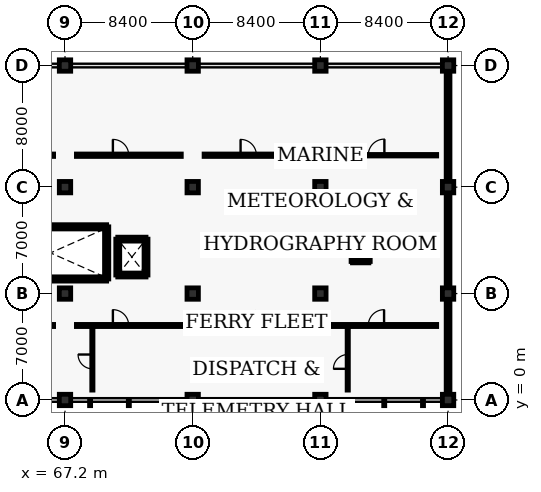
"""IFC4 building model, lengths in metres.
Left out: names, types, materials, properties, quantities, classifications, styles, units other than length and angle.
Written with IfcOpenShell. Run it as: python <this file> out.ifc"""

import sys

from ifc_helpers import new_model, si_unit, direction, frame, frame_2d, origin, origin_2d, place, context, subcontext, project, spatial, rectangle, extrude, element, fill, save


model = new_model("IFC4")
c1 = context("Model", 3, precision=1e-05, world=origin(), true_north=direction((0.0, 1.0)))
c2 = subcontext(c1, "Body", "Model", "MODEL_VIEW")
j1 = project(units=[si_unit("LENGTHUNIT", "METRE"), si_unit("PLANEANGLEUNIT", "RADIAN")], contexts=[c1])
p1 = place(None, origin())
s1 = spatial("IfcSite", under=j1, at=p1, CompositionType="ELEMENT")
p2 = place(p1, origin())
s2 = spatial("IfcBuilding", under=s1, at=p2, CompositionType="ELEMENT")
p3 = place(p2, frame((0.0, 0.0, 9.6)))
s3 = spatial("IfcBuildingStorey", under=s2, at=p3, CompositionType="ELEMENT", Elevation=9.6)
for number, where, z_axis, x_axis in (
    (1, (67.2, 0.0, 0.0), (0.0, 0.0, 1.0), (1.0, 0.0, 0.0)),
    (2, (67.2, 7.0, 0.0), (0.0, 0.0, 1.0), (1.0, 0.0, 0.0)),
    (3, (67.2, 14.0, 0.0), (0.0, 0.0, 1.0), (1.0, 0.0, 0.0)),
    (4, (67.2, 22.0, 0.0), (0.0, 0.0, 1.0), (1.0, 0.0, 0.0)),
    (5, (75.6, 0.0, 0.0), (0.0, 0.0, 1.0), (1.0, 0.0, 0.0)),
    (6, (75.6, 7.0, 0.0), (0.0, 0.0, 1.0), (1.0, 0.0, 0.0)),
    (7, (75.6, 14.0, 0.0), (0.0, 0.0, 1.0), (1.0, 0.0, 0.0)),
    (8, (75.6, 22.0, 0.0), (0.0, 0.0, 1.0), (1.0, 0.0, 0.0)),
    (9, (84.0, 0.0, 0.0), (0.0, 0.0, 1.0), (1.0, 0.0, 0.0)),
    (10, (84.0, 7.0, 0.0), (0.0, 0.0, 1.0), (1.0, 0.0, 0.0)),
    (11, (84.0, 14.0, 0.0), (0.0, 0.0, 1.0), (1.0, 0.0, 0.0)),
    (12, (84.0, 22.0, 0.0), (0.0, 0.0, 1.0), (1.0, 0.0, 0.0)),
    (13, (92.4, 0.0, 0.0), (0.0, 0.0, 1.0), (1.0, 0.0, 0.0)),
    (14, (92.4, 7.0, 0.0), (0.0, 0.0, 1.0), (1.0, 0.0, 0.0)),
    (15, (92.4, 14.0, 0.0), (0.0, 0.0, 1.0), (1.0, 0.0, 0.0)),
    (16, (92.4, 22.0, 0.0), (0.0, 0.0, 1.0), (1.0, 0.0, 0.0)),
):
    element("IfcColumn", number, at=place(p3, frame(where, z_axis=z_axis, x_axis=x_axis)), inside=s3, PredefinedType="COLUMN", context=c2, shape_type="SweptSolid", body=[
        extrude(rectangle(XDim=0.75, YDim=0.75, at=origin_2d()), origin(), (0.0, 0.0, 1.0), 3.52),
    ])
p4 = place(p3, frame((92.4, 0.375, 0.0), z_axis=(0.0, 0.0, 1.0), x_axis=(0.0, 1.0, 0.0)))
e17 = element("IfcWall", 17, at=p4, inside=s3, PredefinedType="SOLIDWALL", context=c2, shape_type="SweptSolid", body=[
    extrude(rectangle(XDim=6.25, YDim=0.25, at=frame_2d((3.125, 0.0))), origin(), (0.0, 0.0, 1.0), 2.605),
])
p5 = place(p4, frame((1.415, 0.0, 0.95)))
e18 = element("IfcOpeningElement", 18, at=p5, cuts=e17, PredefinedType="OPENING", context=c2, shape_type="SweptSolid", body=[
    extrude(rectangle(XDim=1.8, YDim=1.5, at=frame_2d((0.9, 0.75))), frame((0.0, 0.135, 0.0), z_axis=(0.0, -1.0, 0.0), x_axis=(1.0, 0.0, 0.0)), (0.0, 0.0, 1.0), 0.27),
])
p6 = place(p4, frame((4.015, 0.0, 0.95)))
e19 = element("IfcOpeningElement", 19, at=p6, cuts=e17, PredefinedType="OPENING", context=c2, shape_type="SweptSolid", body=[
    extrude(rectangle(XDim=1.5, YDim=1.5, at=frame_2d((0.75, 0.75))), frame((0.0, 0.135, 0.0), z_axis=(0.0, -1.0, 0.0), x_axis=(1.0, 0.0, 0.0)), (0.0, 0.0, 1.0), 0.27),
])
p7 = place(p3, frame((92.4, 7.375, 0.0), z_axis=(0.0, 0.0, 1.0), x_axis=(0.0, 1.0, 0.0)))
e20 = element("IfcWall", 20, at=p7, inside=s3, PredefinedType="SOLIDWALL", context=c2, shape_type="SweptSolid", body=[
    extrude(rectangle(XDim=6.25, YDim=0.25, at=frame_2d((3.125, 0.0))), origin(), (0.0, 0.0, 1.0), 2.605),
])
p8 = place(p7, frame((1.415, 0.0, 0.95)))
e21 = element("IfcOpeningElement", 21, at=p8, cuts=e20, PredefinedType="OPENING", context=c2, shape_type="SweptSolid", body=[
    extrude(rectangle(XDim=1.8, YDim=1.5, at=frame_2d((0.9, 0.75))), frame((0.0, 0.135, 0.0), z_axis=(0.0, -1.0, 0.0), x_axis=(1.0, 0.0, 0.0)), (0.0, 0.0, 1.0), 0.27),
])
p9 = place(p7, frame((4.015, 0.0, 0.95)))
e22 = element("IfcOpeningElement", 22, at=p9, cuts=e20, PredefinedType="OPENING", context=c2, shape_type="SweptSolid", body=[
    extrude(rectangle(XDim=1.5, YDim=1.5, at=frame_2d((0.75, 0.75))), frame((0.0, 0.135, 0.0), z_axis=(0.0, -1.0, 0.0), x_axis=(1.0, 0.0, 0.0)), (0.0, 0.0, 1.0), 0.27),
])
p10 = place(p3, frame((92.4, 14.375, 0.0), z_axis=(0.0, 0.0, 1.0), x_axis=(0.0, 1.0, 0.0)))
e23 = element("IfcWall", 23, at=p10, inside=s3, PredefinedType="SOLIDWALL", context=c2, shape_type="SweptSolid", body=[
    extrude(rectangle(XDim=7.25, YDim=0.25, at=frame_2d((3.625, 0.0))), origin(), (0.0, 0.0, 1.0), 2.605),
])
p11 = place(p10, frame((1.415, 0.0, 0.95)))
e24 = element("IfcOpeningElement", 24, at=p11, cuts=e23, PredefinedType="OPENING", context=c2, shape_type="SweptSolid", body=[
    extrude(rectangle(XDim=1.8, YDim=1.5, at=frame_2d((0.9, 0.75))), frame((0.0, 0.135, 0.0), z_axis=(0.0, -1.0, 0.0), x_axis=(1.0, 0.0, 0.0)), (0.0, 0.0, 1.0), 0.27),
])
p12 = place(p10, frame((4.015, 0.0, 0.95)))
e25 = element("IfcOpeningElement", 25, at=p12, cuts=e23, PredefinedType="OPENING", context=c2, shape_type="SweptSolid", body=[
    extrude(rectangle(XDim=1.5, YDim=1.5, at=frame_2d((0.75, 0.75))), frame((0.0, 0.135, 0.0), z_axis=(0.0, -1.0, 0.0), x_axis=(1.0, 0.0, 0.0)), (0.0, 0.0, 1.0), 0.27),
])
for number, where, z_axis, x_axis in (
    (26, (61.06, 7.96, 0.0), (0.0, 0.0, 1.0), (1.0, 0.0, 0.0)),
    (27, (61.06, 11.39, 0.0), (0.0, 0.0, 1.0), (1.0, 0.0, 0.0)),
):
    element("IfcWall", number, at=place(p3, frame(where, z_axis=z_axis, x_axis=x_axis)), inside=s3, PredefinedType="SHEAR", context=c2, shape_type="SweptSolid", body=[
        extrude(rectangle(XDim=8.88, YDim=0.28, at=frame_2d((4.44, 0.0))), origin(), (0.0, 0.0, 1.0), 3.52),
    ])
p13 = place(p3, frame((69.94, 7.96, 0.0), z_axis=(0.0, 0.0, 1.0), x_axis=(0.0, 1.0, 0.0)))
e28 = element("IfcWall", 28, at=p13, inside=s3, PredefinedType="SHEAR", context=c2, shape_type="SweptSolid", body=[
    extrude(rectangle(XDim=3.43, YDim=0.28, at=frame_2d((1.715, 0.0))), origin(), (0.0, 0.0, 1.0), 3.52),
])
p14 = place(p3, frame((70.67, 8.22, 0.0), z_axis=(0.0, 0.0, 1.0), x_axis=(1.0, 0.0, 0.0)))
e29 = element("IfcWall", 29, at=p14, inside=s3, PredefinedType="SHEAR", context=c2, shape_type="SweptSolid", body=[
    extrude(rectangle(XDim=1.86, YDim=0.26, at=frame_2d((0.93, 0.0))), origin(), (0.0, 0.0, 1.0), 3.52),
])
for number, where, z_axis, x_axis in (
    (30, (72.53, 8.22, 0.0), (0.0, 0.0, 1.0), (0.0, 1.0, 0.0)),
    (31, (70.67, 10.58, 0.0), (0.0, 0.0, 1.0), (0.0, -1.0, 0.0)),
):
    element("IfcWall", number, at=place(p3, frame(where, z_axis=z_axis, x_axis=x_axis)), inside=s3, PredefinedType="SHEAR", context=c2, shape_type="SweptSolid", body=[
        extrude(rectangle(XDim=2.36, YDim=0.26, at=frame_2d((1.18, 0.0))), origin(), (0.0, 0.0, 1.0), 3.52),
    ])
p15 = place(p3, frame((70.67, 10.58, 0.0), z_axis=(0.0, 0.0, 1.0), x_axis=(1.0, 0.0, 0.0)))
e32 = element("IfcWall", 32, at=p15, inside=s3, PredefinedType="SHEAR", context=c2, shape_type="SweptSolid", body=[
    extrude(rectangle(XDim=1.86, YDim=0.26, at=frame_2d((0.93, 0.0))), origin(), (0.0, 0.0, 1.0), 3.52),
])
p16 = place(p15, frame((0.36, 0.0, 0.0)))
e33 = element("IfcOpeningElement", 33, at=p16, cuts=e32, PredefinedType="OPENING", context=c2, shape_type="SweptSolid", body=[
    extrude(rectangle(XDim=1.14, YDim=2.14, at=frame_2d((0.57, 1.07))), frame((0.0, 0.14, 0.0), z_axis=(0.0, -1.0, 0.0), x_axis=(1.0, 0.0, 0.0)), (0.0, 0.0, 1.0), 0.28),
])
for number, where, z_axis, x_axis in (
    (34, (86.11, 9.11, 0.0), (0.0, 0.0, 1.0), (1.0, 0.0, 0.0)),
    (35, (87.19, 9.11, 0.0), (0.0, 0.0, 1.0), (0.0, 1.0, 0.0)),
    (36, (87.19, 10.19, 0.0), (0.0, 0.0, 1.0), (-1.0, 0.0, 0.0)),
    (37, (86.11, 10.19, 0.0), (0.0, 0.0, 1.0), (0.0, -1.0, 0.0)),
):
    element("IfcWall", number, at=place(p3, frame(where, z_axis=z_axis, x_axis=x_axis)), inside=s3, PredefinedType="SOLIDWALL", context=c2, shape_type="SweptSolid", body=[
        extrude(rectangle(XDim=1.08, YDim=0.18, at=frame_2d((0.54, 0.0))), origin(), (0.0, 0.0, 1.0), 2.6),
    ])
p17 = place(p3, frame((59.55, 4.9, 0.0), z_axis=(0.0, 0.0, 1.0), x_axis=(1.0, 0.0, 0.0)))
e38 = element("IfcWall", 38, at=p17, inside=s3, PredefinedType="PARTITIONING", context=c2, shape_type="SweptSolid", body=[
    extrude(rectangle(XDim=6.9, YDim=0.14, at=frame_2d((3.45, 0.0))), origin(), (0.0, 0.0, 1.0), 2.55),
])
p18 = place(p17, frame((2.4, 0.0, 0.0)))
e39 = element("IfcOpeningElement", 39, at=p18, cuts=e38, PredefinedType="OPENING", context=c2, shape_type="SweptSolid", body=[
    extrude(rectangle(XDim=0.98, YDim=2.12, at=frame_2d((0.49, 1.06))), frame((0.0, 0.08, 0.0), z_axis=(0.0, -1.0, 0.0), x_axis=(1.0, 0.0, 0.0)), (0.0, 0.0, 1.0), 0.16),
])
p19 = place(p3, frame((59.55, 16.1, 0.0), z_axis=(0.0, 0.0, 1.0), x_axis=(1.0, 0.0, 0.0)))
e40 = element("IfcWall", 40, at=p19, inside=s3, PredefinedType="PARTITIONING", context=c2, shape_type="SweptSolid", body=[
    extrude(rectangle(XDim=6.9, YDim=0.16, at=frame_2d((3.45, 0.0))), origin(), (0.0, 0.0, 1.0), 2.5),
])
p20 = place(p19, frame((2.4, 0.0, 0.0)))
e41 = element("IfcOpeningElement", 41, at=p20, cuts=e40, PredefinedType="OPENING", context=c2, shape_type="SweptSolid", body=[
    extrude(rectangle(XDim=1.04, YDim=2.14, at=frame_2d((0.52, 1.07))), frame((0.0, 0.09, 0.0), z_axis=(0.0, -1.0, 0.0), x_axis=(1.0, 0.0, 0.0)), (0.0, 0.0, 1.0), 0.18),
])
p21 = place(p3, frame((67.95, 4.9, 0.0), z_axis=(0.0, 0.0, 1.0), x_axis=(1.0, 0.0, 0.0)))
e42 = element("IfcWall", 42, at=p21, inside=s3, PredefinedType="PARTITIONING", context=c2, shape_type="SweptSolid", body=[
    extrude(rectangle(XDim=6.9, YDim=0.14, at=frame_2d((3.45, 0.0))), origin(), (0.0, 0.0, 1.0), 2.55),
])
p22 = place(p21, frame((2.4, 0.0, 0.0)))
e43 = element("IfcOpeningElement", 43, at=p22, cuts=e42, PredefinedType="OPENING", context=c2, shape_type="SweptSolid", body=[
    extrude(rectangle(XDim=1.04, YDim=2.14, at=frame_2d((0.52, 1.07))), frame((0.0, 0.08, 0.0), z_axis=(0.0, -1.0, 0.0), x_axis=(1.0, 0.0, 0.0)), (0.0, 0.0, 1.0), 0.16),
])
p23 = place(p3, frame((69.0, 0.65, 0.0), z_axis=(0.0, 0.0, 1.0), x_axis=(0.0, 1.0, 0.0)))
e44 = element("IfcWall", 44, at=p23, inside=s3, PredefinedType="PARTITIONING", context=c2, shape_type="SweptSolid", body=[
    extrude(rectangle(XDim=4.1, YDim=0.08, at=frame_2d((2.05, 0.0))), origin(), (0.0, 0.0, 1.0), 2.5),
])
p24 = place(p23, frame((1.4, 0.0, 0.0)))
e45 = element("IfcOpeningElement", 45, at=p24, cuts=e44, PredefinedType="OPENING", context=c2, shape_type="SweptSolid", body=[
    extrude(rectangle(XDim=0.94, YDim=2.08, at=frame_2d((0.47, 1.04))), frame((0.0, 0.05, 0.0), z_axis=(0.0, -1.0, 0.0), x_axis=(1.0, 0.0, 0.0)), (0.0, 0.0, 1.0), 0.1),
])
p25 = place(p3, frame((67.95, 16.1, 0.0), z_axis=(0.0, 0.0, 1.0), x_axis=(1.0, 0.0, 0.0)))
e46 = element("IfcWall", 46, at=p25, inside=s3, PredefinedType="PARTITIONING", context=c2, shape_type="SweptSolid", body=[
    extrude(rectangle(XDim=6.9, YDim=0.16, at=frame_2d((3.45, 0.0))), origin(), (0.0, 0.0, 1.0), 2.5),
])
p26 = place(p25, frame((2.4, 0.0, 0.0)))
e47 = element("IfcOpeningElement", 47, at=p26, cuts=e46, PredefinedType="OPENING", context=c2, shape_type="SweptSolid", body=[
    extrude(rectangle(XDim=1.04, YDim=2.14, at=frame_2d((0.52, 1.07))), frame((0.0, 0.09, 0.0), z_axis=(0.0, -1.0, 0.0), x_axis=(1.0, 0.0, 0.0)), (0.0, 0.0, 1.0), 0.18),
])
p27 = place(p3, frame((76.35, 4.9, 0.0), z_axis=(0.0, 0.0, 1.0), x_axis=(1.0, 0.0, 0.0)))
e48 = element("IfcWall", 48, at=p27, inside=s3, PredefinedType="PARTITIONING", context=c2, shape_type="SweptSolid", body=[
    extrude(rectangle(XDim=6.9, YDim=0.14, at=frame_2d((3.45, 0.0))), origin(), (0.0, 0.0, 1.0), 2.55),
])
p28 = place(p27, frame((2.4, 0.0, 0.0)))
e49 = element("IfcOpeningElement", 49, at=p28, cuts=e48, PredefinedType="OPENING", context=c2, shape_type="SweptSolid", body=[
    extrude(rectangle(XDim=0.98, YDim=2.12, at=frame_2d((0.49, 1.06))), frame((0.0, 0.08, 0.0), z_axis=(0.0, -1.0, 0.0), x_axis=(1.0, 0.0, 0.0)), (0.0, 0.0, 1.0), 0.16),
])
p29 = place(p3, frame((76.35, 16.1, 0.0), z_axis=(0.0, 0.0, 1.0), x_axis=(1.0, 0.0, 0.0)))
e50 = element("IfcWall", 50, at=p29, inside=s3, PredefinedType="PARTITIONING", context=c2, shape_type="SweptSolid", body=[
    extrude(rectangle(XDim=6.9, YDim=0.16, at=frame_2d((3.45, 0.0))), origin(), (0.0, 0.0, 1.0), 2.5),
])
p30 = place(p29, frame((2.4, 0.0, 0.0)))
e51 = element("IfcOpeningElement", 51, at=p30, cuts=e50, PredefinedType="OPENING", context=c2, shape_type="SweptSolid", body=[
    extrude(rectangle(XDim=1.04, YDim=2.14, at=frame_2d((0.52, 1.07))), frame((0.0, 0.09, 0.0), z_axis=(0.0, -1.0, 0.0), x_axis=(1.0, 0.0, 0.0)), (0.0, 0.0, 1.0), 0.18),
])
p31 = place(p3, frame((84.75, 4.9, 0.0), z_axis=(0.0, 0.0, 1.0), x_axis=(1.0, 0.0, 0.0)))
e52 = element("IfcWall", 52, at=p31, inside=s3, PredefinedType="PARTITIONING", context=c2, shape_type="SweptSolid", body=[
    extrude(rectangle(XDim=6.9, YDim=0.14, at=frame_2d((3.45, 0.0))), origin(), (0.0, 0.0, 1.0), 2.55),
])
p32 = place(p31, frame((2.4, 0.0, 0.0)))
e53 = element("IfcOpeningElement", 53, at=p32, cuts=e52, PredefinedType="OPENING", context=c2, shape_type="SweptSolid", body=[
    extrude(rectangle(XDim=1.04, YDim=2.14, at=frame_2d((0.52, 1.07))), frame((0.0, 0.08, 0.0), z_axis=(0.0, -1.0, 0.0), x_axis=(1.0, 0.0, 0.0)), (0.0, 0.0, 1.0), 0.16),
])
p33 = place(p3, frame((85.8, 0.65, 0.0), z_axis=(0.0, 0.0, 1.0), x_axis=(0.0, 1.0, 0.0)))
e54 = element("IfcWall", 54, at=p33, inside=s3, PredefinedType="PARTITIONING", context=c2, shape_type="SweptSolid", body=[
    extrude(rectangle(XDim=4.1, YDim=0.08, at=frame_2d((2.05, 0.0))), origin(), (0.0, 0.0, 1.0), 2.5),
])
p34 = place(p33, frame((1.4, 0.0, 0.0)))
e55 = element("IfcOpeningElement", 55, at=p34, cuts=e54, PredefinedType="OPENING", context=c2, shape_type="SweptSolid", body=[
    extrude(rectangle(XDim=0.94, YDim=2.08, at=frame_2d((0.47, 1.04))), frame((0.0, 0.05, 0.0), z_axis=(0.0, -1.0, 0.0), x_axis=(1.0, 0.0, 0.0)), (0.0, 0.0, 1.0), 0.1),
])
p35 = place(p3, frame((84.75, 16.1, 0.0), z_axis=(0.0, 0.0, 1.0), x_axis=(1.0, 0.0, 0.0)))
e56 = element("IfcWall", 56, at=p35, inside=s3, PredefinedType="PARTITIONING", context=c2, shape_type="SweptSolid", body=[
    extrude(rectangle(XDim=6.9, YDim=0.1, at=frame_2d((3.45, 0.0))), origin(), (0.0, 0.0, 1.0), 2.5),
])
p36 = place(p35, frame((2.4, 0.0, 0.0)))
e57 = element("IfcOpeningElement", 57, at=p36, cuts=e56, PredefinedType="OPENING", context=c2, shape_type="SweptSolid", body=[
    extrude(rectangle(XDim=1.06, YDim=2.1, at=frame_2d((0.53, 1.05))), frame((0.0, 0.06, 0.0), z_axis=(0.0, -1.0, 0.0), x_axis=(1.0, 0.0, 0.0)), (0.0, 0.0, 1.0), 0.12),
])
p37 = place(p5, origin())
e58 = element("IfcWindow", 58, at=p37, inside=s3, PartitioningType="DOUBLE_PANEL_VERTICAL", PredefinedType="WINDOW", context=c2, shape_type="SweptSolid", body=[
    extrude(rectangle(XDim=1.8, YDim=1.5, at=frame_2d((0.9, 0.75))), frame((0.0, 0.03, 0.0), z_axis=(0.0, -1.0, 0.0), x_axis=(1.0, 0.0, 0.0)), (0.0, 0.0, 1.0), 0.06),
])
fill(e18, e58)
p38 = place(p6, origin())
e59 = element("IfcWindow", 59, at=p38, inside=s3, PartitioningType="SINGLE_PANEL", PredefinedType="WINDOW", context=c2, shape_type="SweptSolid", body=[
    extrude(rectangle(XDim=1.5, YDim=1.5, at=frame_2d((0.75, 0.75))), frame((0.0, 0.03, 0.0), z_axis=(0.0, -1.0, 0.0), x_axis=(1.0, 0.0, 0.0)), (0.0, 0.0, 1.0), 0.06),
])
fill(e19, e59)
p39 = place(p8, origin())
e60 = element("IfcWindow", 60, at=p39, inside=s3, PartitioningType="DOUBLE_PANEL_VERTICAL", PredefinedType="WINDOW", context=c2, shape_type="SweptSolid", body=[
    extrude(rectangle(XDim=1.8, YDim=1.5, at=frame_2d((0.9, 0.75))), frame((0.0, 0.03, 0.0), z_axis=(0.0, -1.0, 0.0), x_axis=(1.0, 0.0, 0.0)), (0.0, 0.0, 1.0), 0.06),
])
fill(e21, e60)
p40 = place(p9, origin())
e61 = element("IfcWindow", 61, at=p40, inside=s3, PartitioningType="SINGLE_PANEL", PredefinedType="WINDOW", context=c2, shape_type="SweptSolid", body=[
    extrude(rectangle(XDim=1.5, YDim=1.5, at=frame_2d((0.75, 0.75))), frame((0.0, 0.03, 0.0), z_axis=(0.0, -1.0, 0.0), x_axis=(1.0, 0.0, 0.0)), (0.0, 0.0, 1.0), 0.06),
])
fill(e22, e61)
p41 = place(p11, origin())
e62 = element("IfcWindow", 62, at=p41, inside=s3, PartitioningType="DOUBLE_PANEL_VERTICAL", PredefinedType="WINDOW", context=c2, shape_type="SweptSolid", body=[
    extrude(rectangle(XDim=1.8, YDim=1.5, at=frame_2d((0.9, 0.75))), frame((0.0, 0.03, 0.0), z_axis=(0.0, -1.0, 0.0), x_axis=(1.0, 0.0, 0.0)), (0.0, 0.0, 1.0), 0.06),
])
fill(e24, e62)
p42 = place(p12, origin())
e63 = element("IfcWindow", 63, at=p42, inside=s3, PartitioningType="SINGLE_PANEL", PredefinedType="WINDOW", context=c2, shape_type="SweptSolid", body=[
    extrude(rectangle(XDim=1.5, YDim=1.5, at=frame_2d((0.75, 0.75))), frame((0.0, 0.03, 0.0), z_axis=(0.0, -1.0, 0.0), x_axis=(1.0, 0.0, 0.0)), (0.0, 0.0, 1.0), 0.06),
])
fill(e25, e63)
p43 = place(p16, origin())
e64 = element("IfcDoor", 64, at=p43, inside=s3, OperationType="DOUBLE_DOOR_SLIDING", PredefinedType="DOOR", context=c2, shape_type="SweptSolid", body=[
    extrude(rectangle(XDim=1.14, YDim=2.14, at=frame_2d((0.57, 1.07))), frame((0.0, 0.025, 0.0), z_axis=(0.0, -1.0, 0.0), x_axis=(1.0, 0.0, 0.0)), (0.0, 0.0, 1.0), 0.05),
])
fill(e33, e64)
p44 = place(p22, origin())
e65 = element("IfcDoor", 65, at=p44, inside=s3, OperationType="SINGLE_SWING_LEFT", PredefinedType="DOOR", context=c2, shape_type="SweptSolid", body=[
    extrude(rectangle(XDim=1.04, YDim=2.14, at=frame_2d((0.52, 1.07))), frame((0.0, 0.025, 0.0), z_axis=(0.0, -1.0, 0.0), x_axis=(1.0, 0.0, 0.0)), (0.0, 0.0, 1.0), 0.05),
])
fill(e43, e65)
p45 = place(p24, origin())
e66 = element("IfcDoor", 66, at=p45, inside=s3, OperationType="SINGLE_SWING_RIGHT", PredefinedType="DOOR", context=c2, shape_type="SweptSolid", body=[
    extrude(rectangle(XDim=0.94, YDim=2.08, at=frame_2d((0.47, 1.04))), frame((0.0, 0.025, 0.0), z_axis=(0.0, -1.0, 0.0), x_axis=(1.0, 0.0, 0.0)), (0.0, 0.0, 1.0), 0.05),
])
fill(e45, e66)
p46 = place(p26, origin())
e67 = element("IfcDoor", 67, at=p46, inside=s3, OperationType="SINGLE_SWING_LEFT", PredefinedType="DOOR", context=c2, shape_type="SweptSolid", body=[
    extrude(rectangle(XDim=1.04, YDim=2.14, at=frame_2d((0.52, 1.07))), frame((0.0, 0.025, 0.0), z_axis=(0.0, -1.0, 0.0), x_axis=(1.0, 0.0, 0.0)), (0.0, 0.0, 1.0), 0.05),
])
fill(e47, e67)
p47 = place(p28, origin())
e68 = element("IfcDoor", 68, at=p47, inside=s3, OperationType="SINGLE_SWING_RIGHT", PredefinedType="DOOR", context=c2, shape_type="SweptSolid", body=[
    extrude(rectangle(XDim=0.98, YDim=2.12, at=frame_2d((0.49, 1.06))), frame((0.0, 0.025, 0.0), z_axis=(0.0, -1.0, 0.0), x_axis=(1.0, 0.0, 0.0)), (0.0, 0.0, 1.0), 0.05),
])
fill(e49, e68)
p48 = place(p30, origin())
e69 = element("IfcDoor", 69, at=p48, inside=s3, OperationType="SINGLE_SWING_LEFT", PredefinedType="DOOR", context=c2, shape_type="SweptSolid", body=[
    extrude(rectangle(XDim=1.04, YDim=2.14, at=frame_2d((0.52, 1.07))), frame((0.0, 0.025, 0.0), z_axis=(0.0, -1.0, 0.0), x_axis=(1.0, 0.0, 0.0)), (0.0, 0.0, 1.0), 0.05),
])
fill(e51, e69)
p49 = place(p32, origin())
e70 = element("IfcDoor", 70, at=p49, inside=s3, OperationType="SINGLE_SWING_RIGHT", PredefinedType="DOOR", context=c2, shape_type="SweptSolid", body=[
    extrude(rectangle(XDim=1.04, YDim=2.14, at=frame_2d((0.52, 1.07))), frame((0.0, 0.025, 0.0), z_axis=(0.0, -1.0, 0.0), x_axis=(1.0, 0.0, 0.0)), (0.0, 0.0, 1.0), 0.05),
])
fill(e53, e70)
p50 = place(p34, origin())
e71 = element("IfcDoor", 71, at=p50, inside=s3, OperationType="SINGLE_SWING_LEFT", PredefinedType="DOOR", context=c2, shape_type="SweptSolid", body=[
    extrude(rectangle(XDim=0.94, YDim=2.08, at=frame_2d((0.47, 1.04))), frame((0.0, 0.025, 0.0), z_axis=(0.0, -1.0, 0.0), x_axis=(1.0, 0.0, 0.0)), (0.0, 0.0, 1.0), 0.05),
])
fill(e55, e71)
p51 = place(p36, origin())
e72 = element("IfcDoor", 72, at=p51, inside=s3, OperationType="SINGLE_SWING_RIGHT", PredefinedType="DOOR", context=c2, shape_type="SweptSolid", body=[
    extrude(rectangle(XDim=1.06, YDim=2.1, at=frame_2d((0.53, 1.05))), frame((0.0, 0.025, 0.0), z_axis=(0.0, -1.0, 0.0), x_axis=(1.0, 0.0, 0.0)), (0.0, 0.0, 1.0), 0.05),
])
fill(e57, e72)
save(model, sys.argv[1])
